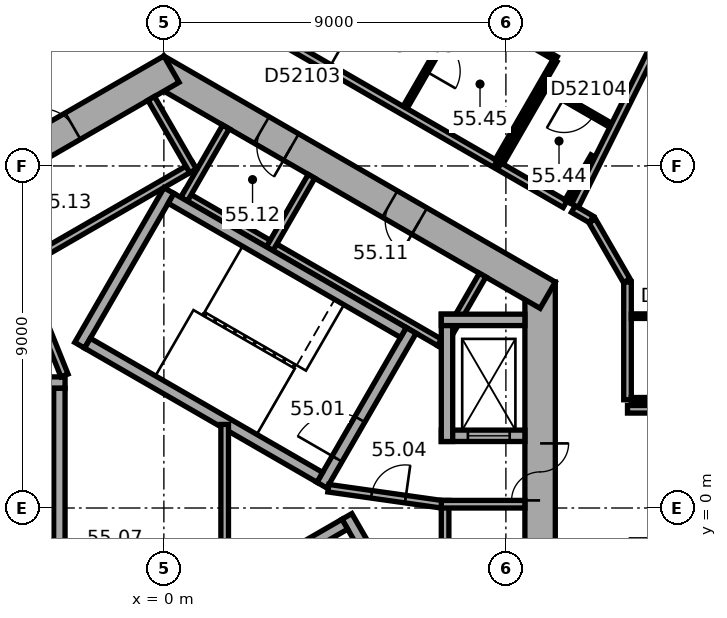
"""IFC4 building model, lengths in metres.
Left out: names, types, materials, properties, quantities, classifications, styles, units other than length and angle.
Written with IfcOpenShell. Run it as: python <this file> out.ifc"""

import sys

from ifc_helpers import new_model, si_unit, direction, frame, frame_2d, origin, place, context, subcontext, project, spatial, rectangle, extrude, element, fill, save


model = new_model("IFC4")
c1 = context("Model", 3, precision=1e-05, world=origin(), true_north=direction((0.0, 1.0)))
c2 = subcontext(c1, "Body", "Model", "MODEL_VIEW")
j1 = project(units=[si_unit("LENGTHUNIT", "METRE"), si_unit("PLANEANGLEUNIT", "RADIAN")], contexts=[c1])
p1 = place(None, origin())
s1 = spatial("IfcSite", under=j1, at=p1, CompositionType="ELEMENT")
p2 = place(p1, origin())
s2 = spatial("IfcBuilding", under=s1, at=p2, CompositionType="ELEMENT")
p3 = place(p2, frame((0.0, 0.0, 225.4)))
s3 = spatial("IfcBuildingStorey", under=s2, at=p3, CompositionType="ELEMENT", Elevation=225.4)
p4 = place(p3, frame((9.9, -5.947, 0.0), z_axis=(0.0, 0.0, 1.0), x_axis=(0.0, 1.0, 0.0)))
e1 = element("IfcWall", 1, at=p4, inside=s3, PredefinedType="SHEAR", context=c2, shape_type="SweptSolid", body=[
    extrude(rectangle(XDim=11.894, YDim=0.8, at=frame_2d((5.947, 0.0))), origin(), (0.0, 0.0, 1.0), 3.7),
])
p5 = place(p4, frame((6.147, 0.0, 0.0)))
e2 = element("IfcOpeningElement", 2, at=p5, cuts=e1, PredefinedType="OPENING", context=c2, shape_type="SweptSolid", body=[
    extrude(rectangle(XDim=1.5, YDim=2.1, at=frame_2d((0.75, 1.05))), frame((0.0, 0.41, 0.0), z_axis=(0.0, -1.0, 0.0), x_axis=(1.0, 0.0, 0.0)), (0.0, 0.0, 1.0), 0.82),
])
p6 = place(p4, frame((2.997, 0.0, 0.0)))
e3 = element("IfcOpeningElement", 3, at=p6, cuts=e1, PredefinedType="OPENING", context=c2, shape_type="SweptSolid", body=[
    extrude(rectangle(XDim=0.9, YDim=2.1, at=frame_2d((0.45, 1.05))), frame((0.0, 0.41, 0.0), z_axis=(0.0, -1.0, 0.0), x_axis=(1.0, 0.0, 0.0)), (0.0, 0.0, 1.0), 0.82),
])
p7 = place(p3, frame((10.1, 5.6, 0.0), z_axis=(0.0, 0.0, 1.0), x_axis=(-0.866023897231, 0.500002609418, 0.0)))
e4 = element("IfcWall", 4, at=p7, inside=s3, PredefinedType="SHEAR", context=c2, shape_type="SweptSolid", body=[
    extrude(rectangle(XDim=11.894, YDim=0.8, at=frame_2d((5.947, 0.0))), origin(), (0.0, 0.0, 1.0), 3.7),
])
p8 = place(p7, frame((3.897, 0.0, 0.0)))
e5 = element("IfcOpeningElement", 5, at=p8, cuts=e4, PredefinedType="OPENING", context=c2, shape_type="SweptSolid", body=[
    extrude(rectangle(XDim=0.9, YDim=2.1, at=frame_2d((0.45, 1.05))), frame((0.0, 0.41, 0.0), z_axis=(0.0, -1.0, 0.0), x_axis=(1.0, 0.0, 0.0)), (0.0, 0.0, 1.0), 0.82),
])
p9 = place(p7, frame((7.797, 0.0, 0.0)))
e6 = element("IfcOpeningElement", 6, at=p9, cuts=e4, PredefinedType="OPENING", context=c2, shape_type="SweptSolid", body=[
    extrude(rectangle(XDim=0.9, YDim=2.1, at=frame_2d((0.45, 1.05))), frame((0.0, 0.41, 0.0), z_axis=(0.0, -1.0, 0.0), x_axis=(1.0, 0.0, 0.0)), (0.0, 0.0, 1.0), 0.82),
])
p10 = place(p3, frame((0.2, 11.547, 0.0), z_axis=(0.0, 0.0, 1.0), x_axis=(-0.866023897231, -0.500002609418, 0.0)))
e7 = element("IfcWall", 7, at=p10, inside=s3, PredefinedType="SHEAR", context=c2, shape_type="SweptSolid", body=[
    extrude(rectangle(XDim=11.894, YDim=0.8, at=frame_2d((5.947, 0.0))), origin(), (0.0, 0.0, 1.0), 3.7),
])
p11 = place(p10, frame((6.147, 0.0, 0.0)))
e8 = element("IfcOpeningElement", 8, at=p11, cuts=e7, PredefinedType="OPENING", context=c2, shape_type="SweptSolid", body=[
    extrude(rectangle(XDim=1.5, YDim=2.1, at=frame_2d((0.75, 1.05))), frame((0.0, 0.41, 0.0), z_axis=(0.0, -1.0, 0.0), x_axis=(1.0, 0.0, 0.0)), (0.0, 0.0, 1.0), 0.82),
])
p12 = place(p10, frame((2.997, 0.0, 0.0)))
e9 = element("IfcOpeningElement", 9, at=p12, cuts=e7, PredefinedType="OPENING", context=c2, shape_type="SweptSolid", body=[
    extrude(rectangle(XDim=0.9, YDim=2.1, at=frame_2d((0.45, 1.05))), frame((0.0, 0.41, 0.0), z_axis=(0.0, -1.0, 0.0), x_axis=(1.0, 0.0, 0.0)), (0.0, 0.0, 1.0), 0.82),
])
p13 = place(p3, frame((7.4, -5.2, 0.0), z_axis=(0.0, 0.0, 1.0), x_axis=(0.0, 1.0, 0.0)))
e10 = element("IfcWall", 10, at=p13, inside=s3, PredefinedType="PARTITIONING", context=c2, shape_type="SweptSolid", body=[
    extrude(rectangle(XDim=5.4, YDim=0.2, at=frame_2d((2.7, 0.0))), origin(), (0.0, 0.0, 1.0), 3.42),
])
p14 = place(p3, frame((7.3, 0.1, 0.0), z_axis=(0.0, 0.0, 1.0), x_axis=(1.0, 0.0, 0.0)))
e11 = element("IfcWall", 11, at=p14, inside=s3, PredefinedType="PARTITIONING", context=c2, shape_type="SweptSolid", body=[
    extrude(rectangle(XDim=2.2, YDim=0.2, at=frame_2d((1.1, 0.0))), origin(), (0.0, 0.0, 1.0), 3.42),
])
p15 = place(p3, frame((7.424, 4.259, 0.0), z_axis=(0.0, 0.0, 1.0), x_axis=(-0.866026010844, 0.49999894854, 0.0)))
e12 = element("IfcWall", 12, at=p15, inside=s3, PredefinedType="PARTITIONING", context=c2, shape_type="SweptSolid", body=[
    extrude(rectangle(XDim=8.0, YDim=0.2, at=frame_2d((4.0, 0.0))), origin(), (0.0, 0.0, 1.0), 3.42),
])
for number, where, z_axis, x_axis in (
    (13, (7.287, 4.222, 0.0), (0.0, 0.0, 1.0), (0.5, 0.866, 0.0)),
    (14, (2.784, 6.822, 0.0), (0.0, 0.0, 1.0), (0.5, 0.866, 0.0)),
    (15, (0.532, 8.122, 0.0), (0.0, 0.0, 1.0), (0.5, 0.866, 0.0)),
):
    element("IfcWall", number, at=place(p3, frame(where, z_axis=z_axis, x_axis=x_axis)), inside=s3, PredefinedType="PARTITIONING", context=c2, shape_type="SweptSolid", body=[
        extrude(rectangle(XDim=2.2, YDim=0.2, at=frame_2d((1.1, 0.0))), origin(), (0.0, 0.0, 1.0), 3.42),
    ])
p16 = place(p3, frame((0.803, 9.009, 0.0), z_axis=(0.0, 0.0, 1.0), x_axis=(-0.866028230842, -0.499995103361, 0.0)))
e16 = element("IfcWall", 16, at=p16, inside=s3, PredefinedType="PARTITIONING", context=c2, shape_type="SweptSolid", body=[
    extrude(rectangle(XDim=5.4, YDim=0.2, at=frame_2d((2.7, 0.0))), origin(), (0.0, 0.0, 1.0), 3.42),
])
p17 = place(p3, frame((0.767, 8.872, 0.0), z_axis=(0.0, 0.0, 1.0), x_axis=(-0.499994660107, 0.866028486751, 0.0)))
e17 = element("IfcWall", 17, at=p17, inside=s3, PredefinedType="PARTITIONING", context=c2, shape_type="SweptSolid", body=[
    extrude(rectangle(XDim=2.2, YDim=0.2, at=frame_2d((1.1, 0.0))), origin(), (0.0, 0.0, 1.0), 3.42),
])
p18 = place(p3, frame((4.158, 0.602, 0.0), z_axis=(0.0, 0.0, 1.0), x_axis=(0.499977259774, 0.866038532462, 0.0)))
e18 = element("IfcWall", 18, at=p18, inside=s3, PredefinedType="SHEAR", context=c2, shape_type="SweptSolid", body=[
    extrude(rectangle(XDim=4.7, YDim=0.3, at=frame_2d((2.35, 0.0))), origin(), (0.0, 0.0, 1.0), 3.42),
])
p19 = place(p18, frame((0.8, 0.0, 0.0)))
e19 = element("IfcOpeningElement", 19, at=p19, cuts=e18, PredefinedType="OPENING", context=c2, shape_type="SweptSolid", body=[
    extrude(rectangle(XDim=1.2, YDim=2.1, at=frame_2d((0.6, 1.05))), frame((0.0, 0.16, 0.0), z_axis=(0.0, -1.0, 0.0), x_axis=(1.0, 0.0, 0.0)), (0.0, 0.0, 1.0), 0.32),
])
p20 = place(p3, frame((-2.216, 4.282, 0.0), z_axis=(0.0, 0.0, 1.0), x_axis=(0.499977259774, 0.866038532462, 0.0)))
e20 = element("IfcWall", 20, at=p20, inside=s3, PredefinedType="SHEAR", context=c2, shape_type="SweptSolid", body=[
    extrude(rectangle(XDim=4.7, YDim=0.3, at=frame_2d((2.35, 0.0))), origin(), (0.0, 0.0, 1.0), 3.42),
])
for number, where, z_axis, x_axis in (
    (21, (4.103, 0.807, 0.0), (0.0, 0.0, 1.0), (-0.866, 0.5, 0.0)),
    (22, (6.303, 4.617, 0.0), (0.0, 0.0, 1.0), (-0.866, 0.5, 0.0)),
):
    element("IfcWall", number, at=place(p3, frame(where, z_axis=z_axis, x_axis=x_axis)), inside=s3, PredefinedType="SHEAR", context=c2, shape_type="SweptSolid", body=[
        extrude(rectangle(XDim=7.06, YDim=0.3, at=frame_2d((3.53, 0.0))), origin(), (0.0, 0.0, 1.0), 3.42),
    ])
p21 = place(p3, frame((-2.6, 3.3, 0.0), z_axis=(0.0, 0.0, 1.0), x_axis=(-1.0, 0.0, 0.0)))
e23 = element("IfcWall", 23, at=p21, inside=s3, PredefinedType="SHEAR", context=c2, shape_type="SweptSolid", body=[
    extrude(rectangle(XDim=4.7, YDim=0.3, at=frame_2d((2.35, 0.0))), origin(), (0.0, 0.0, 1.0), 3.42),
])
p22 = place(p21, frame((0.8, 0.0, 0.0)))
e24 = element("IfcOpeningElement", 24, at=p22, cuts=e23, PredefinedType="OPENING", context=c2, shape_type="SweptSolid", body=[
    extrude(rectangle(XDim=1.2, YDim=2.1, at=frame_2d((0.6, 1.05))), frame((0.0, 0.16, 0.0), z_axis=(0.0, -1.0, 0.0), x_axis=(1.0, 0.0, 0.0)), (0.0, 0.0, 1.0), 0.32),
])
p23 = place(p3, frame((-2.75, 3.15, 0.0), z_axis=(0.0, 0.0, 1.0), x_axis=(0.0, -1.0, 0.0)))
e25 = element("IfcWall", 25, at=p23, inside=s3, PredefinedType="SHEAR", context=c2, shape_type="SweptSolid", body=[
    extrude(rectangle(XDim=7.06, YDim=0.3, at=frame_2d((3.53, 0.0))), origin(), (0.0, 0.0, 1.0), 3.42),
])
p24 = place(p3, frame((4.816, -0.222, 0.0), z_axis=(0.0, 0.0, 1.0), x_axis=(0.499977259774, -0.866038532462, 0.0)))
e26 = element("IfcWall", 26, at=p24, inside=s3, PredefinedType="SHEAR", context=c2, shape_type="SweptSolid", body=[
    extrude(rectangle(XDim=4.7, YDim=0.3, at=frame_2d((2.35, 0.0))), origin(), (0.0, 0.0, 1.0), 3.42),
])
p25 = place(p3, frame((-1.353, -3.957, 0.0), z_axis=(0.0, 0.0, 1.0), x_axis=(0.866027801685, 0.499995846692, 0.0)))
e27 = element("IfcWall", 27, at=p25, inside=s3, PredefinedType="SHEAR", context=c2, shape_type="SweptSolid", body=[
    extrude(rectangle(XDim=7.06, YDim=0.3, at=frame_2d((3.53, 0.0))), origin(), (0.0, 0.0, 1.0), 3.42),
])
p26 = place(p3, frame((7.3, 1.9, 0.0), z_axis=(0.0, 0.0, 1.0), x_axis=(1.0, 0.0, 0.0)))
e28 = element("IfcWall", 28, at=p26, inside=s3, PredefinedType="SHEAR", context=c2, shape_type="SweptSolid", body=[
    extrude(rectangle(XDim=2.2, YDim=0.3, at=frame_2d((1.1, 0.0))), origin(), (0.0, 0.0, 1.0), 3.42),
])
p27 = place(p26, frame((0.7, 0.0, 0.0)))
e29 = element("IfcOpeningElement", 29, at=p27, cuts=e28, PredefinedType="OPENING", context=c2, shape_type="SweptSolid", body=[
    extrude(rectangle(XDim=1.1, YDim=2.1, at=frame_2d((0.55, 1.05))), frame((0.0, 0.16, 0.0), z_axis=(0.0, -1.0, 0.0), x_axis=(1.0, 0.0, 0.0)), (0.0, 0.0, 1.0), 0.32),
])
p28 = place(p3, frame((7.45, 1.75, 0.0), z_axis=(0.0, 0.0, 1.0), x_axis=(0.0, 1.0, 0.0)))
e30 = element("IfcWall", 30, at=p28, inside=s3, PredefinedType="SHEAR", context=c2, shape_type="SweptSolid", body=[
    extrude(rectangle(XDim=3.35, YDim=0.3, at=frame_2d((1.675, 0.0))), origin(), (0.0, 0.0, 1.0), 3.42),
])
p29 = place(p3, frame((7.3, 4.95, 0.0), z_axis=(0.0, 0.0, 1.0), x_axis=(1.0, 0.0, 0.0)))
e31 = element("IfcWall", 31, at=p29, inside=s3, PredefinedType="SHEAR", context=c2, shape_type="SweptSolid", body=[
    extrude(rectangle(XDim=2.2, YDim=0.3, at=frame_2d((1.1, 0.0))), origin(), (0.0, 0.0, 1.0), 3.42),
])
p30 = place(p3, frame((4.327, 0.521, 0.0), z_axis=(0.0, 0.0, 1.0), x_axis=(0.990124376366, -0.14019172346, 0.0)))
e32 = element("IfcWall", 32, at=p30, inside=s3, PredefinedType="PARTITIONING", context=c2, shape_type="SweptSolid", body=[
    extrude(rectangle(XDim=3.002, YDim=0.2, at=frame_2d((1.501, 0.0))), origin(), (0.0, 0.0, 1.0), 3.42),
])
p31 = place(p30, frame((1.15, 0.0, 0.0)))
e33 = element("IfcOpeningElement", 33, at=p31, cuts=e32, PredefinedType="OPENING", context=c2, shape_type="SweptSolid", body=[
    extrude(rectangle(XDim=0.9, YDim=2.1, at=frame_2d((0.45, 1.05))), frame((0.0, 0.11, 0.0), z_axis=(0.0, -1.0, 0.0), x_axis=(1.0, 0.0, 0.0)), (0.0, 0.0, 1.0), 0.22),
])
p32 = place(p3, frame((-2.615, 3.487, 0.0), z_axis=(0.0, 0.0, 1.0), x_axis=(-0.373576831041, 0.92759924068, 0.0)))
e34 = element("IfcWall", 34, at=p32, inside=s3, PredefinedType="PARTITIONING", context=c2, shape_type="SweptSolid", body=[
    extrude(rectangle(XDim=3.002, YDim=0.2, at=frame_2d((1.501, 0.0))), origin(), (0.0, 0.0, 1.0), 3.42),
])
p33 = place(p32, frame((1.15, 0.0, 0.0)))
e35 = element("IfcOpeningElement", 35, at=p33, cuts=e34, PredefinedType="OPENING", context=c2, shape_type="SweptSolid", body=[
    extrude(rectangle(XDim=0.9, YDim=2.1, at=frame_2d((0.45, 1.05))), frame((0.0, 0.11, 0.0), z_axis=(0.0, -1.0, 0.0), x_axis=(1.0, 0.0, 0.0)), (0.0, 0.0, 1.0), 0.22),
])
p34 = place(p3, frame((1.6, -2.198, 0.0), z_axis=(0.0, 0.0, 1.0), x_axis=(0.0, 1.0, 0.0)))
e36 = element("IfcWall", 36, at=p34, inside=s3, PredefinedType="PARTITIONING", context=c2, shape_type="SweptSolid", body=[
    extrude(rectangle(XDim=4.397, YDim=0.2, at=frame_2d((2.198, 0.0))), origin(), (0.0, 0.0, 1.0), 3.42),
])
p35 = place(p3, frame((-1.167, 13.414, 0.0), z_axis=(0.0, 0.0, 1.0), x_axis=(-0.866023347809, -0.500003561037, 0.0)))
e37 = element("IfcWall", 37, at=p35, inside=s3, PredefinedType="PARTITIONING", context=c2, shape_type="SweptSolid", body=[
    extrude(rectangle(XDim=4.661, YDim=0.2, at=frame_2d((2.331, 0.0))), origin(), (0.0, 0.0, 1.0), 3.42),
])
p36 = place(p3, frame((6.347, 10.539, 0.0), z_axis=(0.0, 0.0, 1.0), x_axis=(0.499933790963, 0.866063626216, 0.0)))
e38 = element("IfcWall", 38, at=p36, inside=s3, PredefinedType="PARTITIONING", context=c2, shape_type="SweptSolid", body=[
    extrude(rectangle(XDim=3.1, YDim=0.12, at=frame_2d((1.55, 0.0))), origin(), (0.0, 0.0, 1.0), 3.42),
])
p37 = place(p36, frame((1.1, 0.0, 0.0)))
e39 = element("IfcOpeningElement", 39, at=p37, cuts=e38, PredefinedType="OPENING", context=c2, shape_type="SweptSolid", body=[
    extrude(rectangle(XDim=0.9, YDim=2.1, at=frame_2d((0.45, 1.05))), frame((0.0, 0.07, 0.0), z_axis=(0.0, -1.0, 0.0), x_axis=(1.0, 0.0, 0.0)), (0.0, 0.0, 1.0), 0.14),
])
p38 = place(p3, frame((7.948, 13.193, 0.0), z_axis=(0.0, 0.0, 1.0), x_axis=(0.866019409031, -0.500010383074, 0.0)))
e40 = element("IfcWall", 40, at=p38, inside=s3, PredefinedType="PARTITIONING", context=c2, shape_type="SweptSolid", body=[
    extrude(rectangle(XDim=2.74, YDim=0.12, at=frame_2d((1.37, 0.0))), origin(), (0.0, 0.0, 1.0), 3.42),
])
p39 = place(p3, frame((8.721, 9.052, 0.0), z_axis=(0.0, 0.0, 1.0), x_axis=(-0.866028125821, 0.499995285264, 0.0)))
e41 = element("IfcWall", 41, at=p39, inside=s3, PredefinedType="PARTITIONING", context=c2, shape_type="SweptSolid", body=[
    extrude(rectangle(XDim=8.934, YDim=0.2, at=frame_2d((4.467, 0.0))), origin(), (0.0, 0.0, 1.0), 3.42),
])
p40 = place(p39, frame((5.05, 0.0, 0.0)))
e42 = element("IfcOpeningElement", 42, at=p40, cuts=e41, PredefinedType="OPENING", context=c2, shape_type="SweptSolid", body=[
    extrude(rectangle(XDim=1.0, YDim=2.1, at=frame_2d((0.5, 1.05))), frame((0.0, 0.11, 0.0), z_axis=(0.0, -1.0, 0.0), x_axis=(1.0, 0.0, 0.0)), (0.0, 0.0, 1.0), 0.22),
])
p41 = place(p3, frame((8.875, 9.079, 0.0), z_axis=(0.0, 0.0, 1.0), x_axis=(0.499998129301, 0.86602648383, 0.0)))
e43 = element("IfcWall", 43, at=p41, inside=s3, PredefinedType="PARTITIONING", context=c2, shape_type="SweptSolid", body=[
    extrude(rectangle(XDim=2.3, YDim=0.12, at=frame_2d((1.15, 0.0))), origin(), (0.0, 0.0, 1.0), 3.42),
])
p42 = place(p3, frame((10.077, 11.04, 0.0), z_axis=(0.0, 0.0, 1.0), x_axis=(0.866043088465, -0.499969367985, 0.0)))
e44 = element("IfcWall", 44, at=p42, inside=s3, PredefinedType="PARTITIONING", context=c2, shape_type="SweptSolid", body=[
    extrude(rectangle(XDim=1.94, YDim=0.12, at=frame_2d((0.97, 0.0))), origin(), (0.0, 0.0, 1.0), 3.42),
])
p43 = place(p42, frame((0.52, 0.0, 0.0)))
e45 = element("IfcOpeningElement", 45, at=p43, cuts=e44, PredefinedType="OPENING", context=c2, shape_type="SweptSolid", body=[
    extrude(rectangle(XDim=0.9, YDim=2.1, at=frame_2d((0.45, 1.05))), frame((0.0, 0.07, 0.0), z_axis=(0.0, -1.0, 0.0), x_axis=(1.0, 0.0, 0.0)), (0.0, 0.0, 1.0), 0.14),
])
p44 = place(p3, frame((10.292, 11.771, 0.0), z_axis=(0.0, 0.0, 1.0), x_axis=(-0.500026023896, -0.86601037836, 0.0)))
e46 = element("IfcWall", 46, at=p44, inside=s3, PredefinedType="PARTITIONING", context=c2, shape_type="SweptSolid", body=[
    extrude(rectangle(XDim=3.04, YDim=0.12, at=frame_2d((1.52, 0.0))), origin(), (0.0, 0.0, 1.0), 3.42),
])
p45 = place(p3, frame((10.558, 7.992, 0.0), z_axis=(0.0, 0.0, 1.0), x_axis=(-0.866041268327, 0.499972520799, 0.0)))
e47 = element("IfcWall", 47, at=p45, inside=s3, PredefinedType="PARTITIONING", context=c2, shape_type="SweptSolid", body=[
    extrude(rectangle(XDim=2.0, YDim=0.2, at=frame_2d((1.0, 0.0))), origin(), (0.0, 0.0, 1.0), 3.42),
])
p46 = place(p3, frame((11.25, 7.592, 0.0), z_axis=(0.0, 0.0, 1.0), x_axis=(-0.865993292597, 0.500055614084, 0.0)))
e48 = element("IfcWall", 48, at=p46, inside=s3, PredefinedType="PARTITIONING", context=c2, shape_type="SweptSolid", body=[
    extrude(rectangle(XDim=0.55, YDim=0.2, at=frame_2d((0.275, 0.0))), origin(), (0.0, 0.0, 1.0), 3.42),
])
p47 = place(p3, frame((11.291, 9.263, 0.0), z_axis=(0.0, 0.0, 1.0), x_axis=(-0.500036664704, -0.866004234373, 0.0)))
e49 = element("IfcWall", 49, at=p47, inside=s3, PredefinedType="PARTITIONING", context=c2, shape_type="SweptSolid", body=[
    extrude(rectangle(XDim=1.368, YDim=0.12, at=frame_2d((0.684, 0.0))), origin(), (0.0, 0.0, 1.0), 3.42),
])
p48 = place(p3, frame((12.18, 5.981, 0.0), z_axis=(0.0, 0.0, 1.0), x_axis=(-0.499904359745, 0.86608061467, 0.0)))
e50 = element("IfcWall", 50, at=p48, inside=s3, PredefinedType="PARTITIONING", context=c2, shape_type="SweptSolid", body=[
    extrude(rectangle(XDim=1.82, YDim=0.2, at=frame_2d((0.91, 0.0))), origin(), (0.0, 0.0, 1.0), 3.42),
])
p49 = place(p3, frame((12.2, 2.848, 0.0), z_axis=(0.0, 0.0, 1.0), x_axis=(0.0, 1.0, 0.0)))
e51 = element("IfcWall", 51, at=p49, inside=s3, PredefinedType="PARTITIONING", context=c2, shape_type="SweptSolid", body=[
    extrude(rectangle(XDim=3.099, YDim=0.2, at=frame_2d((1.549, 0.0))), origin(), (0.0, 0.0, 1.0), 3.42),
])
p50 = place(p3, frame((12.3, 5.048, 0.0), z_axis=(0.0, 0.0, 1.0), x_axis=(1.0, 0.0, 0.0)))
e52 = element("IfcWall", 52, at=p50, inside=s3, PredefinedType="PARTITIONING", context=c2, shape_type="SweptSolid", body=[
    extrude(rectangle(XDim=2.5, YDim=0.12, at=frame_2d((1.25, 0.0))), origin(), (0.0, 0.0, 1.0), 3.42),
])
p51 = place(p50, frame((0.8, 0.0, 0.0)))
e53 = element("IfcOpeningElement", 53, at=p51, cuts=e52, PredefinedType="OPENING", context=c2, shape_type="SweptSolid", body=[
    extrude(rectangle(XDim=0.9, YDim=2.1, at=frame_2d((0.45, 1.05))), frame((0.0, 0.07, 0.0), z_axis=(0.0, -1.0, 0.0), x_axis=(1.0, 0.0, 0.0)), (0.0, 0.0, 1.0), 0.14),
])
p52 = place(p3, frame((14.211, 14.76, 0.0), z_axis=(0.0, 0.0, 1.0), x_axis=(-0.446198490295, -0.89493402397, 0.0)))
e54 = element("IfcWall", 54, at=p52, inside=s3, PredefinedType="PARTITIONING", context=c2, shape_type="SweptSolid", body=[
    extrude(rectangle(XDim=7.602, YDim=0.2, at=frame_2d((3.801, 0.0))), origin(), (0.0, 0.0, 1.0), 3.42),
])
p53 = place(p3, frame((14.8, 2.848, 0.0), z_axis=(0.0, 0.0, 1.0), x_axis=(-1.0, 0.0, 0.0)))
e55 = element("IfcWall", 55, at=p53, inside=s3, PredefinedType="PARTITIONING", context=c2, shape_type="SweptSolid", body=[
    extrude(rectangle(XDim=2.5, YDim=0.12, at=frame_2d((1.25, 0.0))), origin(), (0.0, 0.0, 1.0), 3.42),
])
p54 = place(p3, frame((19.55, 2.598, 0.0), z_axis=(0.0, 0.0, 1.0), x_axis=(-1.0, 0.0, 0.0)))
e56 = element("IfcWall", 56, at=p54, inside=s3, PredefinedType="PARTITIONING", context=c2, shape_type="SweptSolid", body=[
    extrude(rectangle(XDim=7.35, YDim=0.2, at=frame_2d((3.675, 0.0))), origin(), (0.0, 0.0, 1.0), 3.42),
])
p55 = place(p54, frame((3.175, 0.0, 0.0)))
e57 = element("IfcOpeningElement", 57, at=p55, cuts=e56, PredefinedType="OPENING", context=c2, shape_type="SweptSolid", body=[
    extrude(rectangle(XDim=1.0, YDim=2.1, at=frame_2d((0.5, 1.05))), frame((0.0, 0.11, 0.0), z_axis=(0.0, -1.0, 0.0), x_axis=(1.0, 0.0, 0.0)), (0.0, 0.0, 1.0), 0.22),
])
p56 = place(p5, origin())
e58 = element("IfcDoor", 58, at=p56, inside=s3, OperationType="DOUBLE_DOOR_SINGLE_SWING", PredefinedType="DOOR", context=c2, shape_type="SweptSolid", body=[
    extrude(rectangle(XDim=1.5, YDim=2.1, at=frame_2d((0.75, 1.05))), frame((0.0, 0.025, 0.0), z_axis=(0.0, -1.0, 0.0), x_axis=(1.0, 0.0, 0.0)), (0.0, 0.0, 1.0), 0.05),
])
fill(e2, e58)
p57 = place(p19, origin())
e59 = element("IfcDoor", 59, at=p57, inside=s3, OperationType="SINGLE_SWING_RIGHT", PredefinedType="DOOR", context=c2, shape_type="SweptSolid", body=[
    extrude(rectangle(XDim=1.2, YDim=2.1, at=frame_2d((0.6, 1.05))), frame((0.0, 0.025, 0.0), z_axis=(0.0, -1.0, 0.0), x_axis=(1.0, 0.0, 0.0)), (0.0, 0.0, 1.0), 0.05),
])
fill(e19, e59)
p58 = place(p31, origin())
e60 = element("IfcDoor", 60, at=p58, inside=s3, OperationType="SINGLE_SWING_LEFT", PredefinedType="DOOR", context=c2, shape_type="SweptSolid", body=[
    extrude(rectangle(XDim=0.9, YDim=2.1, at=frame_2d((0.45, 1.05))), frame((0.0, 0.025, 0.0), z_axis=(0.0, -1.0, 0.0), x_axis=(1.0, 0.0, 0.0)), (0.0, 0.0, 1.0), 0.05),
])
fill(e33, e60)
p59 = place(p8, origin())
e61 = element("IfcDoor", 61, at=p59, inside=s3, OperationType="SINGLE_SWING_LEFT", PredefinedType="DOOR", context=c2, shape_type="SweptSolid", body=[
    extrude(rectangle(XDim=0.9, YDim=2.1, at=frame_2d((0.45, 1.05))), frame((0.0, 0.025, 0.0), z_axis=(0.0, -1.0, 0.0), x_axis=(1.0, 0.0, 0.0)), (0.0, 0.0, 1.0), 0.05),
])
fill(e5, e61)
p60 = place(p9, origin())
e62 = element("IfcDoor", 62, at=p60, inside=s3, OperationType="SINGLE_SWING_LEFT", PredefinedType="DOOR", context=c2, shape_type="SweptSolid", body=[
    extrude(rectangle(XDim=0.9, YDim=2.1, at=frame_2d((0.45, 1.05))), frame((0.0, 0.025, 0.0), z_axis=(0.0, -1.0, 0.0), x_axis=(1.0, 0.0, 0.0)), (0.0, 0.0, 1.0), 0.05),
])
fill(e6, e62)
p61 = place(p12, origin())
e63 = element("IfcDoor", 63, at=p61, inside=s3, OperationType="SINGLE_SWING_LEFT", PredefinedType="DOOR", context=c2, shape_type="SweptSolid", body=[
    extrude(rectangle(XDim=0.9, YDim=2.1, at=frame_2d((0.45, 1.05))), frame((0.0, 0.025, 0.0), z_axis=(0.0, -1.0, 0.0), x_axis=(1.0, 0.0, 0.0)), (0.0, 0.0, 1.0), 0.05),
])
fill(e9, e63)
p62 = place(p27, origin())
e64 = element("IfcDoor", 64, at=p62, inside=s3, OperationType="DOUBLE_DOOR_SLIDING", PredefinedType="DOOR", context=c2, shape_type="SweptSolid", body=[
    extrude(rectangle(XDim=1.1, YDim=2.1, at=frame_2d((0.55, 1.05))), frame((0.0, 0.025, 0.0), z_axis=(0.0, -1.0, 0.0), x_axis=(1.0, 0.0, 0.0)), (0.0, 0.0, 1.0), 0.05),
])
fill(e29, e64)
p63 = place(p40, origin())
e65 = element("IfcDoor", 65, at=p63, inside=s3, OperationType="SINGLE_SWING_LEFT", PredefinedType="DOOR", context=c2, shape_type="SweptSolid", body=[
    extrude(rectangle(XDim=1.0, YDim=2.1, at=frame_2d((0.5, 1.05))), frame((0.0, 0.025, 0.0), z_axis=(0.0, -1.0, 0.0), x_axis=(1.0, 0.0, 0.0)), (0.0, 0.0, 1.0), 0.05),
])
fill(e42, e65)
p64 = place(p43, origin())
e66 = element("IfcDoor", 66, at=p64, inside=s3, OperationType="SINGLE_SWING_LEFT", PredefinedType="DOOR", context=c2, shape_type="SweptSolid", body=[
    extrude(rectangle(XDim=0.9, YDim=2.1, at=frame_2d((0.45, 1.05))), frame((0.0, 0.025, 0.0), z_axis=(0.0, -1.0, 0.0), x_axis=(1.0, 0.0, 0.0)), (0.0, 0.0, 1.0), 0.05),
])
fill(e45, e66)
p65 = place(p37, origin())
e67 = element("IfcDoor", 67, at=p65, inside=s3, OperationType="SINGLE_SWING_LEFT", PredefinedType="DOOR", context=c2, shape_type="SweptSolid", body=[
    extrude(rectangle(XDim=0.9, YDim=2.1, at=frame_2d((0.45, 1.05))), frame((0.0, 0.025, 0.0), z_axis=(0.0, -1.0, 0.0), x_axis=(1.0, 0.0, 0.0)), (0.0, 0.0, 1.0), 0.05),
])
fill(e39, e67)
save(model, sys.argv[1])
